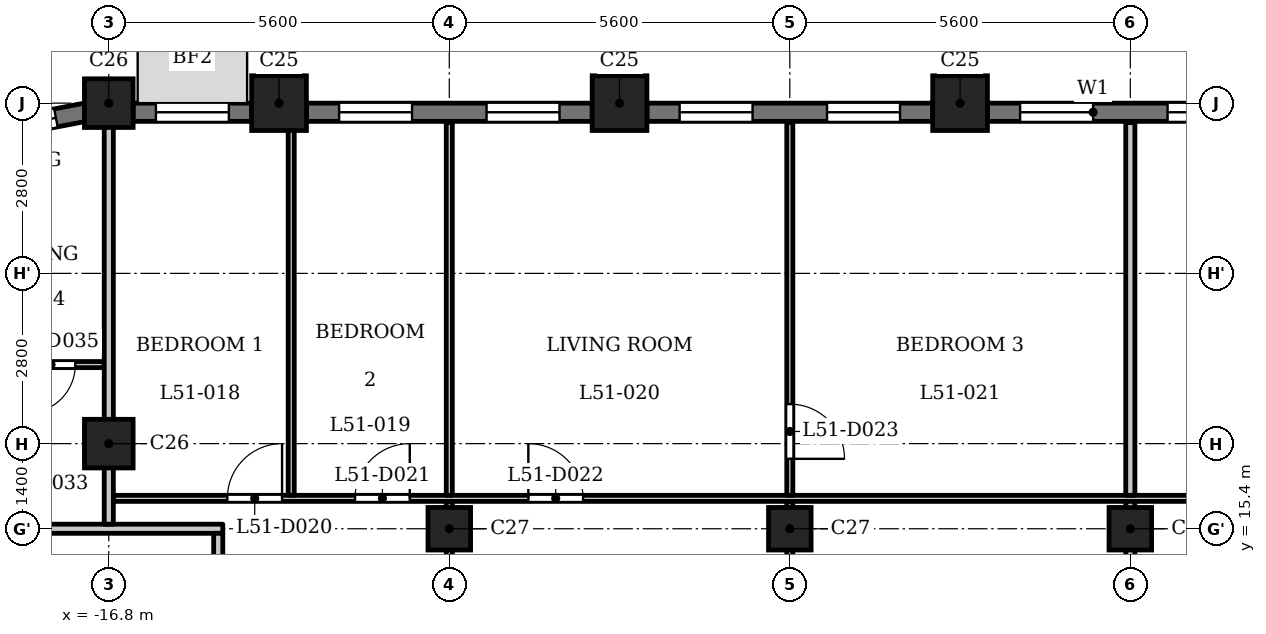
"""IFC4 building model, lengths in metres.
Left out: names, types, materials, properties, quantities, classifications, styles, units other than length and angle.
Written with IfcOpenShell. Run it as: python <this file> out.ifc"""

import sys

from ifc_helpers import new_model, si_unit, direction, frame, frame_2d, origin, origin_2d, place, context, subcontext, project, spatial, rectangle, extrude, element, fill, save


model = new_model("IFC4")
c1 = context("Model", 3, precision=1e-05, world=origin(), true_north=direction((0.0, 1.0)))
c2 = subcontext(c1, "Body", "Model", "MODEL_VIEW")
j1 = project(units=[si_unit("LENGTHUNIT", "METRE"), si_unit("PLANEANGLEUNIT", "RADIAN")], contexts=[c1])
p1 = place(None, origin())
s1 = spatial("IfcSite", under=j1, at=p1, CompositionType="ELEMENT")
p2 = place(p1, origin())
s2 = spatial("IfcBuilding", under=s1, at=p2, CompositionType="ELEMENT")
p3 = place(p2, frame((0.0, 0.0, 199.4)))
s3 = spatial("IfcBuildingStorey", under=s2, at=p3, CompositionType="ELEMENT", Elevation=199.4)
for number, where, z_axis, x_axis in (
    (1, (-2.8, 22.4, 0.0), (0.0, 0.0, 1.0), (1.0, 0.0, 0.0)),
    (2, (-8.4, 22.4, 0.0), (0.0, 0.0, 1.0), (1.0, 0.0, 0.0)),
    (3, (-14.0, 22.4, 0.0), (0.0, 0.0, 1.0), (1.0, 0.0, 0.0)),
):
    element("IfcColumn", number, at=place(p3, frame(where, z_axis=z_axis, x_axis=x_axis)), inside=s3, PredefinedType="COLUMN", context=c2, shape_type="SweptSolid", body=[
        extrude(rectangle(XDim=0.9, YDim=0.9, at=origin_2d()), origin(), (0.0, 0.0, 1.0), 3.5),
    ])
for number, where, z_axis, x_axis in (
    (4, (-16.8, 16.8, 0.0), (0.0, 0.0, 1.0), (1.0, 0.0, 0.0)),
    (5, (-16.8, 22.4, 0.0), (0.0, 0.0, 1.0), (1.0, 0.0, 0.0)),
):
    element("IfcColumn", number, at=place(p3, frame(where, z_axis=z_axis, x_axis=x_axis)), inside=s3, PredefinedType="COLUMN", context=c2, shape_type="SweptSolid", body=[
        extrude(rectangle(XDim=0.8, YDim=0.8, at=origin_2d()), origin(), (0.0, 0.0, 1.0), 3.5),
    ])
for number, where, z_axis, x_axis in (
    (6, (-11.2, 15.4, 0.0), (0.0, 0.0, 1.0), (1.0, 0.0, 0.0)),
    (7, (-5.6, 15.4, 0.0), (0.0, 0.0, 1.0), (1.0, 0.0, 0.0)),
    (8, (0.0, 15.4, 0.0), (0.0, 0.0, 1.0), (1.0, 0.0, 0.0)),
):
    element("IfcColumn", number, at=place(p3, frame(where, z_axis=z_axis, x_axis=x_axis)), inside=s3, PredefinedType="COLUMN", context=c2, shape_type="SweptSolid", body=[
        extrude(rectangle(XDim=0.7, YDim=0.7, at=origin_2d()), origin(), (0.0, 0.0, 1.0), 3.5),
    ])
p4 = place(p3, frame((2.35, 22.25, 0.0), z_axis=(0.0, 0.0, 1.0), x_axis=(-1.0, 0.0, 0.0)))
e9 = element("IfcWall", 9, at=p4, inside=s3, PredefinedType="SOLIDWALL", context=c2, shape_type="SweptSolid", body=[
    extrude(rectangle(XDim=4.7, YDim=0.3, at=frame_2d((2.35, 0.0))), origin(), (0.0, 0.0, 1.0), 2.5),
])
p5 = place(p4, frame((0.538, 0.0, 0.6)))
e10 = element("IfcOpeningElement", 10, at=p5, cuts=e9, PredefinedType="OPENING", context=c2, shape_type="SweptSolid", body=[
    extrude(rectangle(XDim=1.2, YDim=1.55, at=frame_2d((0.6, 0.775))), frame((0.0, 0.16, 0.0), z_axis=(0.0, -1.0, 0.0), x_axis=(1.0, 0.0, 0.0)), (0.0, 0.0, 1.0), 0.32),
])
p6 = place(p4, frame((2.962, 0.0, 0.6)))
e11 = element("IfcOpeningElement", 11, at=p6, cuts=e9, PredefinedType="OPENING", context=c2, shape_type="SweptSolid", body=[
    extrude(rectangle(XDim=1.2, YDim=1.55, at=frame_2d((0.6, 0.775))), frame((0.0, 0.16, 0.0), z_axis=(0.0, -1.0, 0.0), x_axis=(1.0, 0.0, 0.0)), (0.0, 0.0, 1.0), 0.32),
])
p7 = place(p3, frame((-3.25, 22.25, 0.0), z_axis=(0.0, 0.0, 1.0), x_axis=(-1.0, 0.0, 0.0)))
e12 = element("IfcWall", 12, at=p7, inside=s3, PredefinedType="SOLIDWALL", context=c2, shape_type="SweptSolid", body=[
    extrude(rectangle(XDim=4.7, YDim=0.3, at=frame_2d((2.35, 0.0))), origin(), (0.0, 0.0, 1.0), 2.5),
])
p8 = place(p7, frame((0.538, 0.0, 0.6)))
e13 = element("IfcOpeningElement", 13, at=p8, cuts=e12, PredefinedType="OPENING", context=c2, shape_type="SweptSolid", body=[
    extrude(rectangle(XDim=1.2, YDim=1.55, at=frame_2d((0.6, 0.775))), frame((0.0, 0.16, 0.0), z_axis=(0.0, -1.0, 0.0), x_axis=(1.0, 0.0, 0.0)), (0.0, 0.0, 1.0), 0.32),
])
p9 = place(p7, frame((2.962, 0.0, 0.6)))
e14 = element("IfcOpeningElement", 14, at=p9, cuts=e12, PredefinedType="OPENING", context=c2, shape_type="SweptSolid", body=[
    extrude(rectangle(XDim=1.2, YDim=1.55, at=frame_2d((0.6, 0.775))), frame((0.0, 0.16, 0.0), z_axis=(0.0, -1.0, 0.0), x_axis=(1.0, 0.0, 0.0)), (0.0, 0.0, 1.0), 0.32),
])
p10 = place(p3, frame((-8.85, 22.25, 0.0), z_axis=(0.0, 0.0, 1.0), x_axis=(-1.0, 0.0, 0.0)))
e15 = element("IfcWall", 15, at=p10, inside=s3, PredefinedType="SOLIDWALL", context=c2, shape_type="SweptSolid", body=[
    extrude(rectangle(XDim=4.7, YDim=0.3, at=frame_2d((2.35, 0.0))), origin(), (0.0, 0.0, 1.0), 2.5),
])
p11 = place(p10, frame((0.538, 0.0, 0.6)))
e16 = element("IfcOpeningElement", 16, at=p11, cuts=e15, PredefinedType="OPENING", context=c2, shape_type="SweptSolid", body=[
    extrude(rectangle(XDim=1.2, YDim=1.55, at=frame_2d((0.6, 0.775))), frame((0.0, 0.16, 0.0), z_axis=(0.0, -1.0, 0.0), x_axis=(1.0, 0.0, 0.0)), (0.0, 0.0, 1.0), 0.32),
])
p12 = place(p10, frame((2.962, 0.0, 0.6)))
e17 = element("IfcOpeningElement", 17, at=p12, cuts=e15, PredefinedType="OPENING", context=c2, shape_type="SweptSolid", body=[
    extrude(rectangle(XDim=1.2, YDim=1.55, at=frame_2d((0.6, 0.775))), frame((0.0, 0.16, 0.0), z_axis=(0.0, -1.0, 0.0), x_axis=(1.0, 0.0, 0.0)), (0.0, 0.0, 1.0), 0.32),
])
p13 = place(p3, frame((-14.45, 22.25, 0.0), z_axis=(0.0, 0.0, 1.0), x_axis=(-1.0, 0.0, 0.0)))
e18 = element("IfcWall", 18, at=p13, inside=s3, PredefinedType="SOLIDWALL", context=c2, shape_type="SweptSolid", body=[
    extrude(rectangle(XDim=1.95, YDim=0.3, at=frame_2d((0.975, 0.0))), origin(), (0.0, 0.0, 1.0), 2.5),
])
p14 = place(p13, frame((0.375, 0.0, 0.6)))
e19 = element("IfcOpeningElement", 19, at=p14, cuts=e18, PredefinedType="OPENING", context=c2, shape_type="SweptSolid", body=[
    extrude(rectangle(XDim=1.2, YDim=1.55, at=frame_2d((0.6, 0.775))), frame((0.0, 0.16, 0.0), z_axis=(0.0, -1.0, 0.0), x_axis=(1.0, 0.0, 0.0)), (0.0, 0.0, 1.0), 0.32),
])
p15 = place(p3, frame((-17.179, 22.251, 0.0), z_axis=(0.0, 0.0, 1.0), x_axis=(-0.98230529033, -0.187286722942, 0.0)))
e20 = element("IfcWall", 20, at=p15, inside=s3, PredefinedType="SOLIDWALL", context=c2, shape_type="SweptSolid", body=[
    extrude(rectangle(XDim=1.799, YDim=0.3, at=frame_2d((0.899, 0.0))), origin(), (0.0, 0.0, 1.0), 2.5),
])
p16 = place(p15, frame((0.5, 0.0, 0.6)))
e21 = element("IfcOpeningElement", 21, at=p16, cuts=e20, PredefinedType="OPENING", context=c2, shape_type="SweptSolid", body=[
    extrude(rectangle(XDim=0.8, YDim=1.55, at=frame_2d((0.4, 0.775))), frame((0.0, 0.16, 0.0), z_axis=(0.0, -1.0, 0.0), x_axis=(1.0, 0.0, 0.0)), (0.0, 0.0, 1.0), 0.32),
])
p17 = place(p3, frame((-24.684, 15.4, 0.0), z_axis=(0.0, 0.0, 1.0), x_axis=(1.0, 0.0, 0.0)))
e22 = element("IfcWall", 22, at=p17, inside=s3, PredefinedType="PARTITIONING", context=c2, shape_type="SweptSolid", body=[
    extrude(rectangle(XDim=9.759, YDim=0.15, at=frame_2d((4.879, 0.0))), origin(), (0.0, 0.0, 1.0), 3.2),
])
p18 = place(p17, frame((0.984, 0.0, 0.0)))
e23 = element("IfcOpeningElement", 23, at=p18, cuts=e22, PredefinedType="OPENING", context=c2, shape_type="SweptSolid", body=[
    extrude(rectangle(XDim=1.0, YDim=2.1, at=frame_2d((0.5, 1.05))), frame((0.0, 0.085, 0.0), z_axis=(0.0, -1.0, 0.0), x_axis=(1.0, 0.0, 0.0)), (0.0, 0.0, 1.0), 0.17),
])
p19 = place(p3, frame((-16.725, 15.9, 0.0), z_axis=(0.0, 0.0, 1.0), x_axis=(1.0, 0.0, 0.0)))
e24 = element("IfcWall", 24, at=p19, inside=s3, PredefinedType="PARTITIONING", context=c2, shape_type="SweptSolid", body=[
    extrude(rectangle(XDim=33.45, YDim=0.1, at=frame_2d((16.725, 0.0))), origin(), (0.0, 0.0, 1.0), 3.2),
])
p20 = place(p19, frame((1.875, 0.0, 0.0)))
e25 = element("IfcOpeningElement", 25, at=p20, cuts=e24, PredefinedType="OPENING", context=c2, shape_type="SweptSolid", body=[
    extrude(rectangle(XDim=0.9, YDim=2.1, at=frame_2d((0.45, 1.05))), frame((0.0, 0.06, 0.0), z_axis=(0.0, -1.0, 0.0), x_axis=(1.0, 0.0, 0.0)), (0.0, 0.0, 1.0), 0.12),
])
p21 = place(p19, frame((3.975, 0.0, 0.0)))
e26 = element("IfcOpeningElement", 26, at=p21, cuts=e24, PredefinedType="OPENING", context=c2, shape_type="SweptSolid", body=[
    extrude(rectangle(XDim=0.9, YDim=2.1, at=frame_2d((0.45, 1.05))), frame((0.0, 0.06, 0.0), z_axis=(0.0, -1.0, 0.0), x_axis=(1.0, 0.0, 0.0)), (0.0, 0.0, 1.0), 0.12),
])
p22 = place(p19, frame((6.825, 0.0, 0.0)))
e27 = element("IfcOpeningElement", 27, at=p22, cuts=e24, PredefinedType="OPENING", context=c2, shape_type="SweptSolid", body=[
    extrude(rectangle(XDim=0.9, YDim=2.1, at=frame_2d((0.45, 1.05))), frame((0.0, 0.06, 0.0), z_axis=(0.0, -1.0, 0.0), x_axis=(1.0, 0.0, 0.0)), (0.0, 0.0, 1.0), 0.12),
])
p23 = place(p19, frame((28.975, 0.0, 0.0)))
e28 = element("IfcOpeningElement", 28, at=p23, cuts=e24, PredefinedType="OPENING", context=c2, shape_type="SweptSolid", body=[
    extrude(rectangle(XDim=0.9, YDim=2.1, at=frame_2d((0.45, 1.05))), frame((0.0, 0.06, 0.0), z_axis=(0.0, -1.0, 0.0), x_axis=(1.0, 0.0, 0.0)), (0.0, 0.0, 1.0), 0.12),
])
p24 = place(p19, frame((30.725, 0.0, 0.0)))
e29 = element("IfcOpeningElement", 29, at=p24, cuts=e24, PredefinedType="OPENING", context=c2, shape_type="SweptSolid", body=[
    extrude(rectangle(XDim=0.9, YDim=2.1, at=frame_2d((0.45, 1.05))), frame((0.0, 0.06, 0.0), z_axis=(0.0, -1.0, 0.0), x_axis=(1.0, 0.0, 0.0)), (0.0, 0.0, 1.0), 0.12),
])
p25 = place(p19, frame((25.625, 0.0, 0.0)))
e30 = element("IfcOpeningElement", 30, at=p25, cuts=e24, PredefinedType="OPENING", context=c2, shape_type="SweptSolid", body=[
    extrude(rectangle(XDim=0.9, YDim=2.1, at=frame_2d((0.45, 1.05))), frame((0.0, 0.06, 0.0), z_axis=(0.0, -1.0, 0.0), x_axis=(1.0, 0.0, 0.0)), (0.0, 0.0, 1.0), 0.12),
])
p26 = place(p3, frame((-23.64, 18.1, 0.0), z_axis=(0.0, 0.0, 1.0), x_axis=(1.0, 0.0, 0.0)))
e31 = element("IfcWall", 31, at=p26, inside=s3, PredefinedType="PARTITIONING", context=c2, shape_type="SweptSolid", body=[
    extrude(rectangle(XDim=6.765, YDim=0.1, at=frame_2d((3.382, 0.0))), origin(), (0.0, 0.0, 1.0), 3.2),
])
p27 = place(p26, frame((5.49, 0.0, 0.0)))
e32 = element("IfcOpeningElement", 32, at=p27, cuts=e31, PredefinedType="OPENING", context=c2, shape_type="SweptSolid", body=[
    extrude(rectangle(XDim=0.8, YDim=2.1, at=frame_2d((0.4, 1.05))), frame((0.0, 0.06, 0.0), z_axis=(0.0, -1.0, 0.0), x_axis=(1.0, 0.0, 0.0)), (0.0, 0.0, 1.0), 0.12),
])
p28 = place(p26, frame((1.29, 0.0, 0.0)))
e33 = element("IfcOpeningElement", 33, at=p28, cuts=e31, PredefinedType="OPENING", context=c2, shape_type="SweptSolid", body=[
    extrude(rectangle(XDim=0.9, YDim=2.1, at=frame_2d((0.45, 1.05))), frame((0.0, 0.06, 0.0), z_axis=(0.0, -1.0, 0.0), x_axis=(1.0, 0.0, 0.0)), (0.0, 0.0, 1.0), 0.12),
])
p29 = place(p3, frame((-16.8, 15.475, 0.0), z_axis=(0.0, 0.0, 1.0), x_axis=(0.0, 1.0, 0.0)))
e34 = element("IfcWall", 34, at=p29, inside=s3, PredefinedType="PARTITIONING", context=c2, shape_type="SweptSolid", body=[
    extrude(rectangle(XDim=6.835, YDim=0.15, at=frame_2d((3.417, 0.0))), origin(), (0.0, 0.0, 1.0), 2.55),
])
p30 = place(p3, frame((-15.0, 13.275, 0.0), z_axis=(0.0, 0.0, 1.0), x_axis=(0.0, 1.0, 0.0)))
e35 = element("IfcWall", 35, at=p30, inside=s3, PredefinedType="PARTITIONING", context=c2, shape_type="SweptSolid", body=[
    extrude(rectangle(XDim=2.05, YDim=0.15, at=frame_2d((1.025, 0.0))), origin(), (0.0, 0.0, 1.0), 3.2),
])
p31 = place(p30, frame((0.576, 0.0, 0.0)))
e36 = element("IfcOpeningElement", 36, at=p31, cuts=e35, PredefinedType="OPENING", context=c2, shape_type="SweptSolid", body=[
    extrude(rectangle(XDim=1.0, YDim=2.1, at=frame_2d((0.5, 1.05))), frame((0.0, 0.085, 0.0), z_axis=(0.0, -1.0, 0.0), x_axis=(1.0, 0.0, 0.0)), (0.0, 0.0, 1.0), 0.17),
])
p32 = place(p3, frame((-13.8, 15.95, 0.0), z_axis=(0.0, 0.0, 1.0), x_axis=(0.0, 1.0, 0.0)))
e37 = element("IfcWall", 37, at=p32, inside=s3, PredefinedType="PARTITIONING", context=c2, shape_type="SweptSolid", body=[
    extrude(rectangle(XDim=6.88, YDim=0.1, at=frame_2d((3.44, 0.0))), origin(), (0.0, 0.0, 1.0), 3.2),
])
p33 = place(p3, frame((-11.2, 13.275, 0.0), z_axis=(0.0, 0.0, 1.0), x_axis=(0.0, 1.0, 0.0)))
e38 = element("IfcWall", 38, at=p33, inside=s3, PredefinedType="PARTITIONING", context=c2, shape_type="SweptSolid", body=[
    extrude(rectangle(XDim=2.575, YDim=0.1, at=frame_2d((1.288, 0.0))), origin(), (0.0, 0.0, 1.0), 3.2),
])
p34 = place(p33, frame((0.576, 0.0, 0.0)))
e39 = element("IfcOpeningElement", 39, at=p34, cuts=e38, PredefinedType="OPENING", context=c2, shape_type="SweptSolid", body=[
    extrude(rectangle(XDim=0.9, YDim=2.1, at=frame_2d((0.45, 1.05))), frame((0.0, 0.06, 0.0), z_axis=(0.0, -1.0, 0.0), x_axis=(1.0, 0.0, 0.0)), (0.0, 0.0, 1.0), 0.12),
])
p35 = place(p3, frame((-11.2, 15.95, 0.0), z_axis=(0.0, 0.0, 1.0), x_axis=(0.0, 1.0, 0.0)))
e40 = element("IfcWall", 40, at=p35, inside=s3, PredefinedType="PARTITIONING", context=c2, shape_type="SweptSolid", body=[
    extrude(rectangle(XDim=6.13, YDim=0.1, at=frame_2d((3.065, 0.0))), origin(), (0.0, 0.0, 1.0), 3.2),
])
p36 = place(p3, frame((-5.6, 13.275, 0.0), z_axis=(0.0, 0.0, 1.0), x_axis=(0.0, 1.0, 0.0)))
e41 = element("IfcWall", 41, at=p36, inside=s3, PredefinedType="PARTITIONING", context=c2, shape_type="SweptSolid", body=[
    extrude(rectangle(XDim=2.575, YDim=0.1, at=frame_2d((1.288, 0.0))), origin(), (0.0, 0.0, 1.0), 3.2),
])
p37 = place(p36, frame((0.576, 0.0, 0.0)))
e42 = element("IfcOpeningElement", 42, at=p37, cuts=e41, PredefinedType="OPENING", context=c2, shape_type="SweptSolid", body=[
    extrude(rectangle(XDim=0.8, YDim=2.1, at=frame_2d((0.4, 1.05))), frame((0.0, 0.06, 0.0), z_axis=(0.0, -1.0, 0.0), x_axis=(1.0, 0.0, 0.0)), (0.0, 0.0, 1.0), 0.12),
])
p38 = place(p3, frame((-5.6, 15.95, 0.0), z_axis=(0.0, 0.0, 1.0), x_axis=(0.0, 1.0, 0.0)))
e43 = element("IfcWall", 43, at=p38, inside=s3, PredefinedType="PARTITIONING", context=c2, shape_type="SweptSolid", body=[
    extrude(rectangle(XDim=6.13, YDim=0.1, at=frame_2d((3.065, 0.0))), origin(), (0.0, 0.0, 1.0), 3.2),
])
p39 = place(p38, frame((0.6, 0.0, 0.0)))
e44 = element("IfcOpeningElement", 44, at=p39, cuts=e43, PredefinedType="OPENING", context=c2, shape_type="SweptSolid", body=[
    extrude(rectangle(XDim=0.9, YDim=2.1, at=frame_2d((0.45, 1.05))), frame((0.0, 0.06, 0.0), z_axis=(0.0, -1.0, 0.0), x_axis=(1.0, 0.0, 0.0)), (0.0, 0.0, 1.0), 0.12),
])
p40 = place(p3, frame((0.0, 13.275, 0.0), z_axis=(0.0, 0.0, 1.0), x_axis=(0.0, 1.0, 0.0)))
e45 = element("IfcWall", 45, at=p40, inside=s3, PredefinedType="PARTITIONING", context=c2, shape_type="SweptSolid", body=[
    extrude(rectangle(XDim=2.575, YDim=0.15, at=frame_2d((1.288, 0.0))), origin(), (0.0, 0.0, 1.0), 3.2),
])
p41 = place(p3, frame((0.0, 15.95, 0.0), z_axis=(0.0, 0.0, 1.0), x_axis=(0.0, 1.0, 0.0)))
e46 = element("IfcWall", 46, at=p41, inside=s3, PredefinedType="PARTITIONING", context=c2, shape_type="SweptSolid", body=[
    extrude(rectangle(XDim=6.13, YDim=0.15, at=frame_2d((3.065, 0.0))), origin(), (0.0, 0.0, 1.0), 3.2),
])
p42 = place(p20, origin())
e47 = element("IfcDoor", 47, at=p42, inside=s3, OperationType="SINGLE_SWING_LEFT", PredefinedType="DOOR", context=c2, shape_type="SweptSolid", body=[
    extrude(rectangle(XDim=0.9, YDim=2.1, at=frame_2d((0.45, 1.05))), frame((0.0, 0.025, 0.0), z_axis=(0.0, -1.0, 0.0), x_axis=(1.0, 0.0, 0.0)), (0.0, 0.0, 1.0), 0.05),
])
fill(e25, e47)
p43 = place(p21, origin())
e48 = element("IfcDoor", 48, at=p43, inside=s3, OperationType="SINGLE_SWING_LEFT", PredefinedType="DOOR", context=c2, shape_type="SweptSolid", body=[
    extrude(rectangle(XDim=0.9, YDim=2.1, at=frame_2d((0.45, 1.05))), frame((0.0, 0.025, 0.0), z_axis=(0.0, -1.0, 0.0), x_axis=(1.0, 0.0, 0.0)), (0.0, 0.0, 1.0), 0.05),
])
fill(e26, e48)
p44 = place(p22, origin())
e49 = element("IfcDoor", 49, at=p44, inside=s3, OperationType="SINGLE_SWING_RIGHT", PredefinedType="DOOR", context=c2, shape_type="SweptSolid", body=[
    extrude(rectangle(XDim=0.9, YDim=2.1, at=frame_2d((0.45, 1.05))), frame((0.0, 0.025, 0.0), z_axis=(0.0, -1.0, 0.0), x_axis=(1.0, 0.0, 0.0)), (0.0, 0.0, 1.0), 0.05),
])
fill(e27, e49)
p45 = place(p39, origin())
e50 = element("IfcDoor", 50, at=p45, inside=s3, OperationType="SINGLE_SWING_LEFT", PredefinedType="DOOR", context=c2, shape_type="SweptSolid", body=[
    extrude(rectangle(XDim=0.9, YDim=2.1, at=frame_2d((0.45, 1.05))), frame((0.0, 0.025, 0.0), z_axis=(0.0, -1.0, 0.0), x_axis=(1.0, 0.0, 0.0)), (0.0, 0.0, 1.0), 0.05),
])
fill(e44, e50)
p46 = place(p27, origin())
e51 = element("IfcDoor", 51, at=p46, inside=s3, OperationType="SINGLE_SWING_LEFT", PredefinedType="DOOR", context=c2, shape_type="SweptSolid", body=[
    extrude(rectangle(XDim=0.8, YDim=2.1, at=frame_2d((0.4, 1.05))), frame((0.0, 0.025, 0.0), z_axis=(0.0, -1.0, 0.0), x_axis=(1.0, 0.0, 0.0)), (0.0, 0.0, 1.0), 0.05),
])
fill(e32, e51)
p47 = place(p5, origin())
e52 = element("IfcWindow", 52, at=p47, inside=s3, PartitioningType="SINGLE_PANEL", PredefinedType="WINDOW", context=c2, shape_type="SweptSolid", body=[
    extrude(rectangle(XDim=1.2, YDim=1.55, at=frame_2d((0.6, 0.775))), frame((0.0, 0.03, 0.0), z_axis=(0.0, -1.0, 0.0), x_axis=(1.0, 0.0, 0.0)), (0.0, 0.0, 1.0), 0.06),
])
fill(e10, e52)
p48 = place(p6, origin())
e53 = element("IfcWindow", 53, at=p48, inside=s3, PartitioningType="SINGLE_PANEL", PredefinedType="WINDOW", context=c2, shape_type="SweptSolid", body=[
    extrude(rectangle(XDim=1.2, YDim=1.55, at=frame_2d((0.6, 0.775))), frame((0.0, 0.03, 0.0), z_axis=(0.0, -1.0, 0.0), x_axis=(1.0, 0.0, 0.0)), (0.0, 0.0, 1.0), 0.06),
])
fill(e11, e53)
p49 = place(p8, origin())
e54 = element("IfcWindow", 54, at=p49, inside=s3, PartitioningType="SINGLE_PANEL", PredefinedType="WINDOW", context=c2, shape_type="SweptSolid", body=[
    extrude(rectangle(XDim=1.2, YDim=1.55, at=frame_2d((0.6, 0.775))), frame((0.0, 0.03, 0.0), z_axis=(0.0, -1.0, 0.0), x_axis=(1.0, 0.0, 0.0)), (0.0, 0.0, 1.0), 0.06),
])
fill(e13, e54)
p50 = place(p9, origin())
e55 = element("IfcWindow", 55, at=p50, inside=s3, PartitioningType="SINGLE_PANEL", PredefinedType="WINDOW", context=c2, shape_type="SweptSolid", body=[
    extrude(rectangle(XDim=1.2, YDim=1.55, at=frame_2d((0.6, 0.775))), frame((0.0, 0.03, 0.0), z_axis=(0.0, -1.0, 0.0), x_axis=(1.0, 0.0, 0.0)), (0.0, 0.0, 1.0), 0.06),
])
fill(e14, e55)
p51 = place(p11, origin())
e56 = element("IfcWindow", 56, at=p51, inside=s3, PartitioningType="SINGLE_PANEL", PredefinedType="WINDOW", context=c2, shape_type="SweptSolid", body=[
    extrude(rectangle(XDim=1.2, YDim=1.55, at=frame_2d((0.6, 0.775))), frame((0.0, 0.03, 0.0), z_axis=(0.0, -1.0, 0.0), x_axis=(1.0, 0.0, 0.0)), (0.0, 0.0, 1.0), 0.06),
])
fill(e16, e56)
p52 = place(p12, origin())
e57 = element("IfcWindow", 57, at=p52, inside=s3, PartitioningType="SINGLE_PANEL", PredefinedType="WINDOW", context=c2, shape_type="SweptSolid", body=[
    extrude(rectangle(XDim=1.2, YDim=1.55, at=frame_2d((0.6, 0.775))), frame((0.0, 0.03, 0.0), z_axis=(0.0, -1.0, 0.0), x_axis=(1.0, 0.0, 0.0)), (0.0, 0.0, 1.0), 0.06),
])
fill(e17, e57)
p53 = place(p14, origin())
e58 = element("IfcWindow", 58, at=p53, inside=s3, PartitioningType="SINGLE_PANEL", PredefinedType="WINDOW", context=c2, shape_type="SweptSolid", body=[
    extrude(rectangle(XDim=1.2, YDim=1.55, at=frame_2d((0.6, 0.775))), frame((0.0, 0.03, 0.0), z_axis=(0.0, -1.0, 0.0), x_axis=(1.0, 0.0, 0.0)), (0.0, 0.0, 1.0), 0.06),
])
fill(e19, e58)
p54 = place(p16, origin())
e59 = element("IfcWindow", 59, at=p54, inside=s3, PartitioningType="SINGLE_PANEL", PredefinedType="WINDOW", context=c2, shape_type="SweptSolid", body=[
    extrude(rectangle(XDim=0.8, YDim=1.55, at=frame_2d((0.4, 0.775))), frame((0.0, 0.03, 0.0), z_axis=(0.0, -1.0, 0.0), x_axis=(1.0, 0.0, 0.0)), (0.0, 0.0, 1.0), 0.06),
])
fill(e21, e59)
save(model, sys.argv[1])
